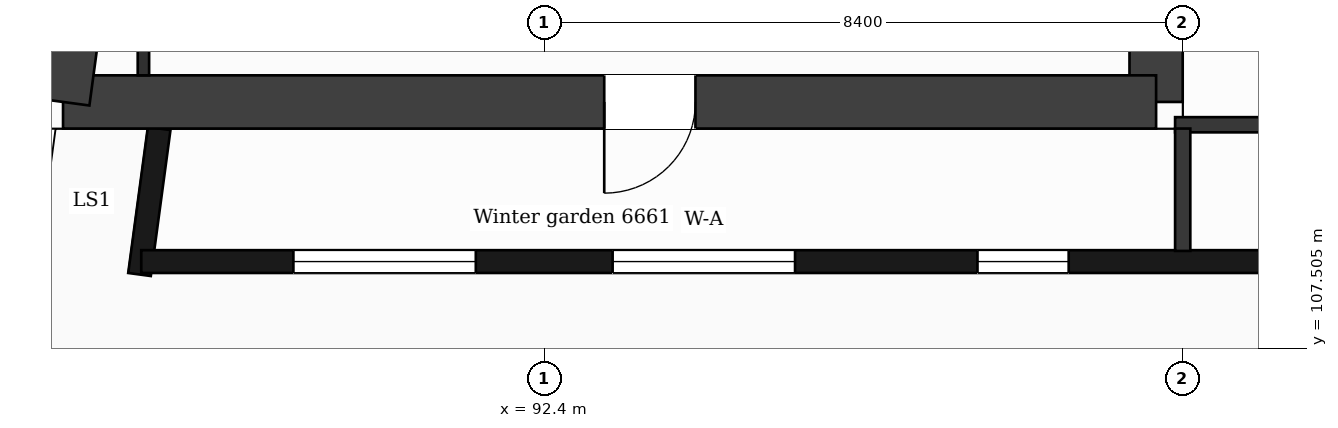
"""IFC4 building model, lengths in metres.
Left out: names, types, materials, properties, quantities, classifications, styles, units other than length and angle.
Written with IfcOpenShell. Run it as: python <this file> out.ifc"""

import sys

from ifc_helpers import new_model, si_unit, direction, frame, frame_2d, origin, place, context, subcontext, project, spatial, rectangle, extrude, element, fill, save


model = new_model("IFC4")
c1 = context("Model", 3, precision=1e-05, world=origin(), true_north=direction((0.0, 1.0)))
c2 = subcontext(c1, "Body", "Model", "MODEL_VIEW")
j1 = project(units=[si_unit("LENGTHUNIT", "METRE"), si_unit("PLANEANGLEUNIT", "RADIAN")], contexts=[c1])
p1 = place(None, origin())
s1 = spatial("IfcSite", under=j1, at=p1, CompositionType="ELEMENT")
p2 = place(p1, origin())
s2 = spatial("IfcBuilding", under=s1, at=p2, CompositionType="ELEMENT")
p3 = place(p2, frame((0.0, 0.0, 273.8)))
s3 = spatial("IfcBuildingStorey", under=s2, at=p3, CompositionType="ELEMENT", Elevation=273.8)
p4 = place(p3, frame((100.45, 132.05, 0.0), z_axis=(0.0, 0.0, 1.0), x_axis=(0.0, -1.0, 0.0)))
e1 = element("IfcWall", 1, at=p4, inside=s3, PredefinedType="SHEAR", context=c2, shape_type="SweptSolid", body=[
    extrude(rectangle(XDim=21.3, YDim=0.7, at=frame_2d((10.65, 0.0))), origin(), (0.0, 0.0, 1.0), 3.7),
])
p5 = place(p4, frame((7.9, 0.0, 0.0)))
e2 = element("IfcOpeningElement", 2, at=p5, cuts=e1, PredefinedType="OPENING", context=c2, shape_type="SweptSolid", body=[
    extrude(rectangle(XDim=1.4, YDim=2.1, at=frame_2d((0.7, 1.05))), frame((0.0, 0.36, 0.0), z_axis=(0.0, -1.0, 0.0), x_axis=(1.0, 0.0, 0.0)), (0.0, 0.0, 1.0), 0.72),
])
p6 = place(p3, frame((100.45, 110.75, 0.0), z_axis=(0.0, 0.0, 1.0), x_axis=(-1.0, 0.0, 0.0)))
e3 = element("IfcWall", 3, at=p6, inside=s3, PredefinedType="SHEAR", context=c2, shape_type="SweptSolid", body=[
    extrude(rectangle(XDim=14.38, YDim=0.7, at=frame_2d((7.19, 0.0))), origin(), (0.0, 0.0, 1.0), 3.7),
])
p7 = place(p6, frame((6.06, 0.0, 0.0)))
e4 = element("IfcOpeningElement", 4, at=p7, cuts=e3, PredefinedType="OPENING", context=c2, shape_type="SweptSolid", body=[
    extrude(rectangle(XDim=1.2, YDim=2.1, at=frame_2d((0.6, 1.05))), frame((0.0, 0.36, 0.0), z_axis=(0.0, -1.0, 0.0), x_axis=(1.0, 0.0, 0.0)), (0.0, 0.0, 1.0), 0.72),
])
p8 = place(p3, frame((86.07, 110.75, 0.0), z_axis=(0.0, 0.0, 1.0), x_axis=(0.133406218907, 0.991061441464, 0.0)))
e5 = element("IfcWall", 5, at=p8, inside=s3, PredefinedType="SHEAR", context=c2, shape_type="SweptSolid", body=[
    extrude(rectangle(XDim=21.492, YDim=0.7, at=frame_2d((10.746, 0.0))), origin(), (0.0, 0.0, 1.0), 3.7),
])
p9 = place(p3, frame((87.334, 110.4, 0.0), z_axis=(0.0, 0.0, 1.0), x_axis=(-0.13345962011, -0.991054251694, 0.0)))
e6 = element("IfcWall", 6, at=p9, inside=s3, PredefinedType="SOLIDWALL", context=c2, shape_type="SweptSolid", body=[
    extrude(rectangle(XDim=1.937, YDim=0.3, at=frame_2d((0.969, 0.0))), origin(), (0.0, 0.0, 1.0), 3.38),
])
p10 = place(p3, frame((87.099, 108.65, 0.0), z_axis=(0.0, 0.0, 1.0), x_axis=(1.0, 0.0, 0.0)))
e7 = element("IfcWall", 7, at=p10, inside=s3, PredefinedType="SOLIDWALL", context=c2, shape_type="SweptSolid", body=[
    extrude(rectangle(XDim=52.774, YDim=0.3, at=frame_2d((26.387, 0.0))), origin(), (0.0, 0.0, 1.0), 3.38),
])
p11 = place(p10, frame((2.001, 0.0, 0.9)))
e8 = element("IfcOpeningElement", 8, at=p11, cuts=e7, PredefinedType="OPENING", context=c2, shape_type="SweptSolid", body=[
    extrude(rectangle(XDim=2.4, YDim=2.1, at=frame_2d((1.2, 1.05))), frame((0.0, 0.16, 0.0), z_axis=(0.0, -1.0, 0.0), x_axis=(1.0, 0.0, 0.0)), (0.0, 0.0, 1.0), 0.32),
])
p12 = place(p10, frame((6.201, 0.0, 0.9)))
e9 = element("IfcOpeningElement", 9, at=p12, cuts=e7, PredefinedType="OPENING", context=c2, shape_type="SweptSolid", body=[
    extrude(rectangle(XDim=2.4, YDim=2.1, at=frame_2d((1.2, 1.05))), frame((0.0, 0.16, 0.0), z_axis=(0.0, -1.0, 0.0), x_axis=(1.0, 0.0, 0.0)), (0.0, 0.0, 1.0), 0.32),
])
p13 = place(p10, frame((11.001, 0.0, 0.9)))
e10 = element("IfcOpeningElement", 10, at=p13, cuts=e7, PredefinedType="OPENING", context=c2, shape_type="SweptSolid", body=[
    extrude(rectangle(XDim=1.2, YDim=2.1, at=frame_2d((0.6, 1.05))), frame((0.0, 0.16, 0.0), z_axis=(0.0, -1.0, 0.0), x_axis=(1.0, 0.0, 0.0)), (0.0, 0.0, 1.0), 0.32),
])
p14 = place(p10, frame((15.201, 0.0, 0.9)))
e11 = element("IfcOpeningElement", 11, at=p14, cuts=e7, PredefinedType="OPENING", context=c2, shape_type="SweptSolid", body=[
    extrude(rectangle(XDim=1.2, YDim=2.1, at=frame_2d((0.6, 1.05))), frame((0.0, 0.16, 0.0), z_axis=(0.0, -1.0, 0.0), x_axis=(1.0, 0.0, 0.0)), (0.0, 0.0, 1.0), 0.32),
])
p15 = place(p10, frame((18.802, 0.0, 0.9)))
e12 = element("IfcOpeningElement", 12, at=p15, cuts=e7, PredefinedType="OPENING", context=c2, shape_type="SweptSolid", body=[
    extrude(rectangle(XDim=2.4, YDim=2.1, at=frame_2d((1.2, 1.05))), frame((0.0, 0.16, 0.0), z_axis=(0.0, -1.0, 0.0), x_axis=(1.0, 0.0, 0.0)), (0.0, 0.0, 1.0), 0.32),
])
p16 = place(p10, frame((23.001, 0.0, 0.9)))
e13 = element("IfcOpeningElement", 13, at=p16, cuts=e7, PredefinedType="OPENING", context=c2, shape_type="SweptSolid", body=[
    extrude(rectangle(XDim=2.4, YDim=2.1, at=frame_2d((1.2, 1.05))), frame((0.0, 0.16, 0.0), z_axis=(0.0, -1.0, 0.0), x_axis=(1.0, 0.0, 0.0)), (0.0, 0.0, 1.0), 0.32),
])
p17 = place(p10, frame((27.201, 0.0, 0.9)))
e14 = element("IfcOpeningElement", 14, at=p17, cuts=e7, PredefinedType="OPENING", context=c2, shape_type="SweptSolid", body=[
    extrude(rectangle(XDim=2.4, YDim=2.1, at=frame_2d((1.2, 1.05))), frame((0.0, 0.16, 0.0), z_axis=(0.0, -1.0, 0.0), x_axis=(1.0, 0.0, 0.0)), (0.0, 0.0, 1.0), 0.32),
])
p18 = place(p10, frame((31.401, 0.0, 0.9)))
e15 = element("IfcOpeningElement", 15, at=p18, cuts=e7, PredefinedType="OPENING", context=c2, shape_type="SweptSolid", body=[
    extrude(rectangle(XDim=2.4, YDim=2.1, at=frame_2d((1.2, 1.05))), frame((0.0, 0.16, 0.0), z_axis=(0.0, -1.0, 0.0), x_axis=(1.0, 0.0, 0.0)), (0.0, 0.0, 1.0), 0.32),
])
p19 = place(p10, frame((35.602, 0.0, 0.9)))
e16 = element("IfcOpeningElement", 16, at=p19, cuts=e7, PredefinedType="OPENING", context=c2, shape_type="SweptSolid", body=[
    extrude(rectangle(XDim=2.4, YDim=2.1, at=frame_2d((1.2, 1.05))), frame((0.0, 0.16, 0.0), z_axis=(0.0, -1.0, 0.0), x_axis=(1.0, 0.0, 0.0)), (0.0, 0.0, 1.0), 0.32),
])
p20 = place(p10, frame((40.401, 0.0, 0.9)))
e17 = element("IfcOpeningElement", 17, at=p20, cuts=e7, PredefinedType="OPENING", context=c2, shape_type="SweptSolid", body=[
    extrude(rectangle(XDim=1.2, YDim=2.1, at=frame_2d((0.6, 1.05))), frame((0.0, 0.16, 0.0), z_axis=(0.0, -1.0, 0.0), x_axis=(1.0, 0.0, 0.0)), (0.0, 0.0, 1.0), 0.32),
])
p21 = place(p10, frame((44.602, 0.0, 0.9)))
e18 = element("IfcOpeningElement", 18, at=p21, cuts=e7, PredefinedType="OPENING", context=c2, shape_type="SweptSolid", body=[
    extrude(rectangle(XDim=1.2, YDim=2.1, at=frame_2d((0.6, 1.05))), frame((0.0, 0.16, 0.0), z_axis=(0.0, -1.0, 0.0), x_axis=(1.0, 0.0, 0.0)), (0.0, 0.0, 1.0), 0.32),
])
p22 = place(p10, frame((47.901, 0.0, 0.0)))
e19 = element("IfcOpeningElement", 19, at=p22, cuts=e7, PredefinedType="OPENING", context=c2, shape_type="SweptSolid", body=[
    extrude(rectangle(XDim=1.2, YDim=2.4, at=frame_2d((0.6, 1.2))), frame((0.0, 0.16, 0.0), z_axis=(0.0, -1.0, 0.0), x_axis=(1.0, 0.0, 0.0)), (0.0, 0.0, 1.0), 0.32),
])
p23 = place(p10, frame((49.701, 0.0, 0.9)))
e20 = element("IfcOpeningElement", 20, at=p23, cuts=e7, PredefinedType="OPENING", context=c2, shape_type="SweptSolid", body=[
    extrude(rectangle(XDim=1.2, YDim=2.1, at=frame_2d((0.6, 1.05))), frame((0.0, 0.16, 0.0), z_axis=(0.0, -1.0, 0.0), x_axis=(1.0, 0.0, 0.0)), (0.0, 0.0, 1.0), 0.32),
])
p24 = place(p3, frame((100.7, 110.45, 0.0), z_axis=(0.0, 0.0, 1.0), x_axis=(1.0, 0.0, 0.0)))
e21 = element("IfcWall", 21, at=p24, inside=s3, PredefinedType="PARTITIONING", context=c2, shape_type="SweptSolid", body=[
    extrude(rectangle(XDim=25.4, YDim=0.2, at=frame_2d((12.7, 0.0))), origin(), (0.0, 0.0, 1.0), 3.38),
])
p25 = place(p3, frame((87.127, 111.1, 0.0), z_axis=(0.0, 0.0, 1.0), x_axis=(0.0, 1.0, 0.0)))
e22 = element("IfcWall", 22, at=p25, inside=s3, PredefinedType="PARTITIONING", context=c2, shape_type="SweptSolid", body=[
    extrude(rectangle(XDim=1.8, YDim=0.15, at=frame_2d((0.9, 0.0))), origin(), (0.0, 0.0, 1.0), 3.38),
])
p26 = place(p3, frame((100.8, 108.79, 0.0), z_axis=(0.0, 0.0, 1.0), x_axis=(0.0, 1.0, 0.0)))
e23 = element("IfcWall", 23, at=p26, inside=s3, PredefinedType="PARTITIONING", context=c2, shape_type="SweptSolid", body=[
    extrude(rectangle(XDim=1.61, YDim=0.2, at=frame_2d((0.805, 0.0))), origin(), (0.0, 0.0, 1.0), 3.38),
])
p27 = place(p11, origin())
e24 = element("IfcWindow", 24, at=p27, inside=s3, PartitioningType="SINGLE_PANEL", PredefinedType="WINDOW", context=c2, shape_type="SweptSolid", body=[
    extrude(rectangle(XDim=2.4, YDim=2.1, at=frame_2d((1.2, 1.05))), frame((0.0, 0.03, 0.0), z_axis=(0.0, -1.0, 0.0), x_axis=(1.0, 0.0, 0.0)), (0.0, 0.0, 1.0), 0.06),
])
fill(e8, e24)
p28 = place(p12, origin())
e25 = element("IfcWindow", 25, at=p28, inside=s3, PartitioningType="SINGLE_PANEL", PredefinedType="WINDOW", context=c2, shape_type="SweptSolid", body=[
    extrude(rectangle(XDim=2.4, YDim=2.1, at=frame_2d((1.2, 1.05))), frame((0.0, 0.03, 0.0), z_axis=(0.0, -1.0, 0.0), x_axis=(1.0, 0.0, 0.0)), (0.0, 0.0, 1.0), 0.06),
])
fill(e9, e25)
p29 = place(p13, origin())
e26 = element("IfcWindow", 26, at=p29, inside=s3, PartitioningType="SINGLE_PANEL", PredefinedType="WINDOW", context=c2, shape_type="SweptSolid", body=[
    extrude(rectangle(XDim=1.2, YDim=2.1, at=frame_2d((0.6, 1.05))), frame((0.0, 0.03, 0.0), z_axis=(0.0, -1.0, 0.0), x_axis=(1.0, 0.0, 0.0)), (0.0, 0.0, 1.0), 0.06),
])
fill(e10, e26)
p30 = place(p7, origin())
e27 = element("IfcDoor", 27, at=p30, inside=s3, OperationType="SINGLE_SWING_RIGHT", PredefinedType="DOOR", context=c2, shape_type="SweptSolid", body=[
    extrude(rectangle(XDim=1.2, YDim=2.1, at=frame_2d((0.6, 1.05))), frame((0.0, 0.025, 0.0), z_axis=(0.0, -1.0, 0.0), x_axis=(1.0, 0.0, 0.0)), (0.0, 0.0, 1.0), 0.05),
])
fill(e4, e27)
save(model, sys.argv[1])
